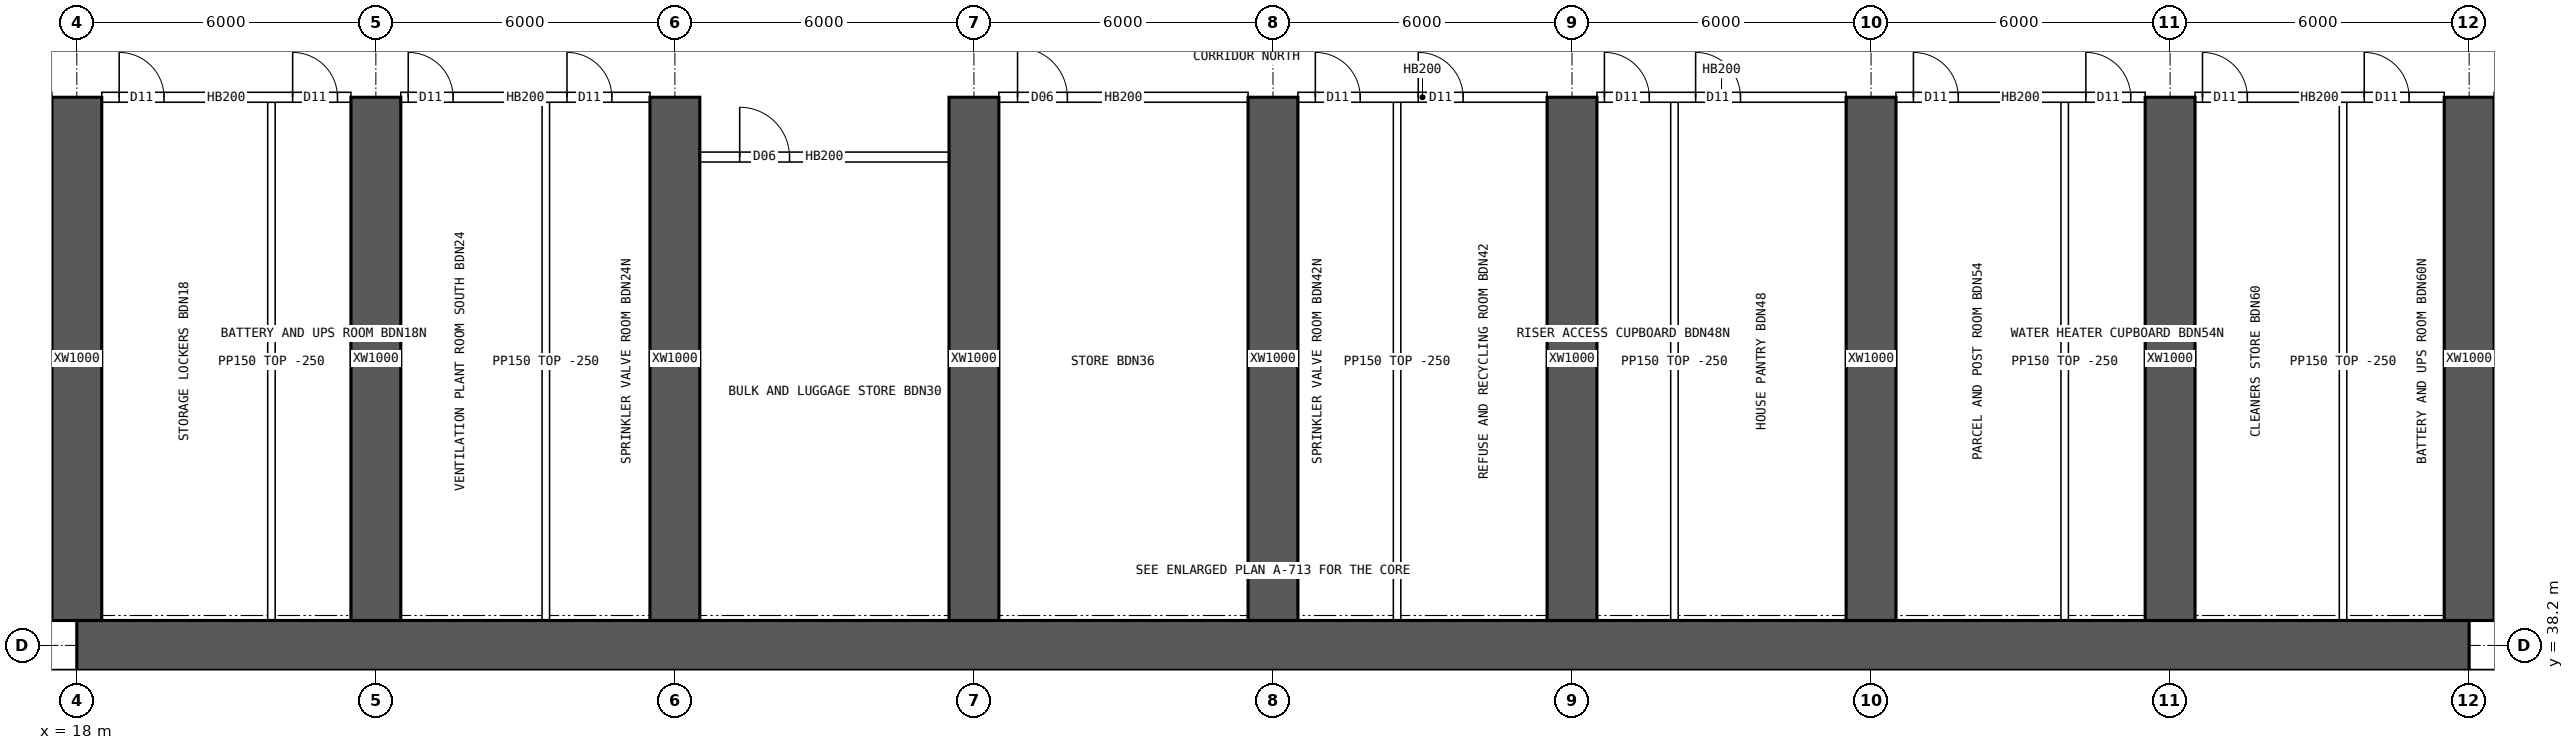
"""IFC4 building model, lengths in metres.
Left out: names, types, materials, properties, quantities, classifications, styles, units other than length and angle.
Written with IfcOpenShell. Run it as: python <this file> out.ifc"""

import sys

from ifc_helpers import new_model, si_unit, direction, frame, frame_2d, origin, place, context, subcontext, project, spatial, rectangle, extrude, element, fill, save


model = new_model("IFC4")
c1 = context("Model", 3, precision=1e-05, world=origin(), true_north=direction((0.0, 1.0)))
c2 = subcontext(c1, "Body", "Model", "MODEL_VIEW")
j1 = project(units=[si_unit("LENGTHUNIT", "METRE"), si_unit("PLANEANGLEUNIT", "RADIAN")], contexts=[c1])
p1 = place(None, origin())
s1 = spatial("IfcSite", under=j1, at=p1, CompositionType="ELEMENT")
p2 = place(p1, origin())
s2 = spatial("IfcBuilding", under=s1, at=p2, CompositionType="ELEMENT")
p3 = place(p2, frame((0.0, 0.0, 42.7)))
s3 = spatial("IfcBuildingStorey", under=s2, at=p3, CompositionType="ELEMENT", Elevation=42.7)
p4 = place(p3, frame((18.0, 38.2, 0.0), z_axis=(0.0, 0.0, 1.0), x_axis=(1.0, 0.0, 0.0)))
e1 = element("IfcWall", 1, at=p4, inside=s3, PredefinedType="SHEAR", context=c2, shape_type="SweptSolid", body=[
    extrude(rectangle(XDim=48.0, YDim=1.0, at=frame_2d((24.0, 0.0))), origin(), (0.0, 0.0, 1.0), 3.75),
])
for number, where, z_axis, x_axis in (
    (2, (21.6, 34.75, 0.0), (0.0, 0.0, 1.0), (0.0, 1.0, 0.0)),
    (3, (62.4, 34.75, 0.0), (0.0, 0.0, 1.0), (0.0, 1.0, 0.0)),
    (4, (26.0, 34.75, 0.0), (0.0, 0.0, 1.0), (0.0, 1.0, 0.0)),
    (5, (58.0, 34.75, 0.0), (0.0, 0.0, 1.0), (0.0, 1.0, 0.0)),
):
    element("IfcWall", number, at=place(p3, frame(where, z_axis=z_axis, x_axis=x_axis)), inside=s3, PredefinedType="SHEAR", context=c2, shape_type="SweptSolid", body=[
        extrude(rectangle(XDim=2.95, YDim=0.3, at=frame_2d((1.475, 0.0))), origin(), (0.0, 0.0, 1.0), 3.75),
    ])
for number, where, z_axis, x_axis in (
    (6, (18.0, 38.7, 0.0), (0.0, 0.0, 1.0), (0.0, 1.0, 0.0)),
    (7, (24.0, 38.7, 0.0), (0.0, 0.0, 1.0), (0.0, 1.0, 0.0)),
    (8, (30.0, 38.7, 0.0), (0.0, 0.0, 1.0), (0.0, 1.0, 0.0)),
    (9, (36.0, 38.7, 0.0), (0.0, 0.0, 1.0), (0.0, 1.0, 0.0)),
    (10, (42.0, 38.7, 0.0), (0.0, 0.0, 1.0), (0.0, 1.0, 0.0)),
    (11, (48.0, 38.7, 0.0), (0.0, 0.0, 1.0), (0.0, 1.0, 0.0)),
    (12, (54.0, 38.7, 0.0), (0.0, 0.0, 1.0), (0.0, 1.0, 0.0)),
    (13, (60.0, 38.7, 0.0), (0.0, 0.0, 1.0), (0.0, 1.0, 0.0)),
    (14, (66.0, 38.7, 0.0), (0.0, 0.0, 1.0), (0.0, 1.0, 0.0)),
):
    element("IfcWall", number, at=place(p3, frame(where, z_axis=z_axis, x_axis=x_axis)), inside=s3, PredefinedType="SHEAR", context=c2, shape_type="SweptSolid", body=[
        extrude(rectangle(XDim=10.5, YDim=1.0, at=frame_2d((5.25, 0.0))), origin(), (0.0, 0.0, 1.0), 3.75),
    ])
for number, where, z_axis, x_axis in (
    (15, (29.651, 34.75, 0.0), (0.0, 0.0, 1.0), (0.0, 1.0, 0.0)),
    (16, (33.946, 34.75, 0.0), (0.0, 0.0, 1.0), (0.0, 1.0, 0.0)),
    (17, (36.946, 34.75, 0.0), (0.0, 0.0, 1.0), (0.0, 1.0, 0.0)),
    (18, (41.463, 34.75, 0.0), (0.0, 0.0, 1.0), (0.0, 1.0, 0.0)),
    (19, (45.758, 34.75, 0.0), (0.0, 0.0, 1.0), (0.0, 1.0, 0.0)),
    (20, (47.058, 34.75, 0.0), (0.0, 0.0, 1.0), (0.0, 1.0, 0.0)),
    (21, (52.124, 34.75, 0.0), (0.0, 0.0, 1.0), (0.0, 1.0, 0.0)),
    (22, (54.961, 34.75, 0.0), (0.0, 0.0, 1.0), (0.0, 1.0, 0.0)),
):
    element("IfcWall", number, at=place(p3, frame(where, z_axis=z_axis, x_axis=x_axis)), inside=s3, PredefinedType="SOLIDWALL", context=c2, shape_type="SweptSolid", body=[
        extrude(rectangle(XDim=2.95, YDim=0.15, at=frame_2d((1.475, 0.0))), origin(), (0.0, 0.0, 1.0), 3.5),
    ])
p5 = place(p3, frame((18.5, 49.2, 0.0), z_axis=(0.0, 0.0, 1.0), x_axis=(1.0, 0.0, 0.0)))
e23 = element("IfcWall", 23, at=p5, inside=s3, PredefinedType="SOLIDWALL", context=c2, shape_type="SweptSolid", body=[
    extrude(rectangle(XDim=5.0, YDim=0.2, at=frame_2d((2.5, 0.0))), origin(), (0.0, 0.0, 1.0), 3.5),
])
p6 = place(p5, frame((0.35, 0.0, 0.0)))
e24 = element("IfcOpeningElement", 24, at=p6, cuts=e23, PredefinedType="OPENING", context=c2, shape_type="SweptSolid", body=[
    extrude(rectangle(XDim=0.9, YDim=2.1, at=frame_2d((0.45, 1.05))), frame((0.0, 0.11, 0.0), z_axis=(0.0, -1.0, 0.0), x_axis=(1.0, 0.0, 0.0)), (0.0, 0.0, 1.0), 0.22),
])
p7 = place(p5, frame((3.83, 0.0, 0.0)))
e25 = element("IfcOpeningElement", 25, at=p7, cuts=e23, PredefinedType="OPENING", context=c2, shape_type="SweptSolid", body=[
    extrude(rectangle(XDim=0.9, YDim=2.1, at=frame_2d((0.45, 1.05))), frame((0.0, 0.11, 0.0), z_axis=(0.0, -1.0, 0.0), x_axis=(1.0, 0.0, 0.0)), (0.0, 0.0, 1.0), 0.22),
])
p8 = place(p3, frame((24.5, 49.2, 0.0), z_axis=(0.0, 0.0, 1.0), x_axis=(1.0, 0.0, 0.0)))
e26 = element("IfcWall", 26, at=p8, inside=s3, PredefinedType="SOLIDWALL", context=c2, shape_type="SweptSolid", body=[
    extrude(rectangle(XDim=5.0, YDim=0.2, at=frame_2d((2.5, 0.0))), origin(), (0.0, 0.0, 1.0), 3.5),
])
p9 = place(p8, frame((0.15, 0.0, 0.0)))
e27 = element("IfcOpeningElement", 27, at=p9, cuts=e26, PredefinedType="OPENING", context=c2, shape_type="SweptSolid", body=[
    extrude(rectangle(XDim=0.9, YDim=2.1, at=frame_2d((0.45, 1.05))), frame((0.0, 0.11, 0.0), z_axis=(0.0, -1.0, 0.0), x_axis=(1.0, 0.0, 0.0)), (0.0, 0.0, 1.0), 0.22),
])
p10 = place(p8, frame((3.335, 0.0, 0.0)))
e28 = element("IfcOpeningElement", 28, at=p10, cuts=e26, PredefinedType="OPENING", context=c2, shape_type="SweptSolid", body=[
    extrude(rectangle(XDim=0.9, YDim=2.1, at=frame_2d((0.45, 1.05))), frame((0.0, 0.11, 0.0), z_axis=(0.0, -1.0, 0.0), x_axis=(1.0, 0.0, 0.0)), (0.0, 0.0, 1.0), 0.22),
])
p11 = place(p3, frame((36.5, 49.2, 0.0), z_axis=(0.0, 0.0, 1.0), x_axis=(1.0, 0.0, 0.0)))
e29 = element("IfcWall", 29, at=p11, inside=s3, PredefinedType="SOLIDWALL", context=c2, shape_type="SweptSolid", body=[
    extrude(rectangle(XDim=5.0, YDim=0.2, at=frame_2d((2.5, 0.0))), origin(), (0.0, 0.0, 1.0), 3.5),
])
p12 = place(p11, frame((0.375, 0.0, 0.0)))
e30 = element("IfcOpeningElement", 30, at=p12, cuts=e29, PredefinedType="OPENING", context=c2, shape_type="SweptSolid", body=[
    extrude(rectangle(XDim=1.0, YDim=2.1, at=frame_2d((0.5, 1.05))), frame((0.0, 0.11, 0.0), z_axis=(0.0, -1.0, 0.0), x_axis=(1.0, 0.0, 0.0)), (0.0, 0.0, 1.0), 0.22),
])
p13 = place(p3, frame((42.5, 49.2, 0.0), z_axis=(0.0, 0.0, 1.0), x_axis=(1.0, 0.0, 0.0)))
e31 = element("IfcWall", 31, at=p13, inside=s3, PredefinedType="SOLIDWALL", context=c2, shape_type="SweptSolid", body=[
    extrude(rectangle(XDim=5.0, YDim=0.2, at=frame_2d((2.5, 0.0))), origin(), (0.0, 0.0, 1.0), 3.5),
])
p14 = place(p13, frame((0.35, 0.0, 0.0)))
e32 = element("IfcOpeningElement", 32, at=p14, cuts=e31, PredefinedType="OPENING", context=c2, shape_type="SweptSolid", body=[
    extrude(rectangle(XDim=0.9, YDim=2.1, at=frame_2d((0.45, 1.05))), frame((0.0, 0.11, 0.0), z_axis=(0.0, -1.0, 0.0), x_axis=(1.0, 0.0, 0.0)), (0.0, 0.0, 1.0), 0.22),
])
p15 = place(p13, frame((2.415, 0.0, 0.0)))
e33 = element("IfcOpeningElement", 33, at=p15, cuts=e31, PredefinedType="OPENING", context=c2, shape_type="SweptSolid", body=[
    extrude(rectangle(XDim=0.9, YDim=2.1, at=frame_2d((0.45, 1.05))), frame((0.0, 0.11, 0.0), z_axis=(0.0, -1.0, 0.0), x_axis=(1.0, 0.0, 0.0)), (0.0, 0.0, 1.0), 0.22),
])
p16 = place(p3, frame((48.5, 49.2, 0.0), z_axis=(0.0, 0.0, 1.0), x_axis=(1.0, 0.0, 0.0)))
e34 = element("IfcWall", 34, at=p16, inside=s3, PredefinedType="SOLIDWALL", context=c2, shape_type="SweptSolid", body=[
    extrude(rectangle(XDim=5.0, YDim=0.2, at=frame_2d((2.5, 0.0))), origin(), (0.0, 0.0, 1.0), 3.5),
])
p17 = place(p16, frame((0.15, 0.0, 0.0)))
e35 = element("IfcOpeningElement", 35, at=p17, cuts=e34, PredefinedType="OPENING", context=c2, shape_type="SweptSolid", body=[
    extrude(rectangle(XDim=0.9, YDim=2.1, at=frame_2d((0.45, 1.05))), frame((0.0, 0.11, 0.0), z_axis=(0.0, -1.0, 0.0), x_axis=(1.0, 0.0, 0.0)), (0.0, 0.0, 1.0), 0.22),
])
p18 = place(p16, frame((1.98, 0.0, 0.0)))
e36 = element("IfcOpeningElement", 36, at=p18, cuts=e34, PredefinedType="OPENING", context=c2, shape_type="SweptSolid", body=[
    extrude(rectangle(XDim=0.9, YDim=2.1, at=frame_2d((0.45, 1.05))), frame((0.0, 0.11, 0.0), z_axis=(0.0, -1.0, 0.0), x_axis=(1.0, 0.0, 0.0)), (0.0, 0.0, 1.0), 0.22),
])
p19 = place(p3, frame((54.5, 49.2, 0.0), z_axis=(0.0, 0.0, 1.0), x_axis=(1.0, 0.0, 0.0)))
e37 = element("IfcWall", 37, at=p19, inside=s3, PredefinedType="SOLIDWALL", context=c2, shape_type="SweptSolid", body=[
    extrude(rectangle(XDim=5.0, YDim=0.2, at=frame_2d((2.5, 0.0))), origin(), (0.0, 0.0, 1.0), 3.5),
])
p20 = place(p19, frame((0.35, 0.0, 0.0)))
e38 = element("IfcOpeningElement", 38, at=p20, cuts=e37, PredefinedType="OPENING", context=c2, shape_type="SweptSolid", body=[
    extrude(rectangle(XDim=0.9, YDim=2.1, at=frame_2d((0.45, 1.05))), frame((0.0, 0.11, 0.0), z_axis=(0.0, -1.0, 0.0), x_axis=(1.0, 0.0, 0.0)), (0.0, 0.0, 1.0), 0.22),
])
p21 = place(p19, frame((3.81, 0.0, 0.0)))
e39 = element("IfcOpeningElement", 39, at=p21, cuts=e37, PredefinedType="OPENING", context=c2, shape_type="SweptSolid", body=[
    extrude(rectangle(XDim=0.9, YDim=2.1, at=frame_2d((0.45, 1.05))), frame((0.0, 0.11, 0.0), z_axis=(0.0, -1.0, 0.0), x_axis=(1.0, 0.0, 0.0)), (0.0, 0.0, 1.0), 0.22),
])
p22 = place(p3, frame((60.5, 49.2, 0.0), z_axis=(0.0, 0.0, 1.0), x_axis=(1.0, 0.0, 0.0)))
e40 = element("IfcWall", 40, at=p22, inside=s3, PredefinedType="SOLIDWALL", context=c2, shape_type="SweptSolid", body=[
    extrude(rectangle(XDim=5.0, YDim=0.2, at=frame_2d((2.5, 0.0))), origin(), (0.0, 0.0, 1.0), 3.5),
])
p23 = place(p22, frame((0.15, 0.0, 0.0)))
e41 = element("IfcOpeningElement", 41, at=p23, cuts=e40, PredefinedType="OPENING", context=c2, shape_type="SweptSolid", body=[
    extrude(rectangle(XDim=0.9, YDim=2.1, at=frame_2d((0.45, 1.05))), frame((0.0, 0.11, 0.0), z_axis=(0.0, -1.0, 0.0), x_axis=(1.0, 0.0, 0.0)), (0.0, 0.0, 1.0), 0.22),
])
p24 = place(p22, frame((3.395, 0.0, 0.0)))
e42 = element("IfcOpeningElement", 42, at=p24, cuts=e40, PredefinedType="OPENING", context=c2, shape_type="SweptSolid", body=[
    extrude(rectangle(XDim=0.9, YDim=2.1, at=frame_2d((0.45, 1.05))), frame((0.0, 0.11, 0.0), z_axis=(0.0, -1.0, 0.0), x_axis=(1.0, 0.0, 0.0)), (0.0, 0.0, 1.0), 0.22),
])
for number, where, z_axis, x_axis in (
    (43, (21.905, 38.7, 0.0), (0.0, 0.0, 1.0), (0.0, 1.0, 0.0)),
    (44, (27.41, 38.7, 0.0), (0.0, 0.0, 1.0), (0.0, 1.0, 0.0)),
):
    element("IfcWall", number, at=place(p3, frame(where, z_axis=z_axis, x_axis=x_axis)), inside=s3, PredefinedType="PARTITIONING", context=c2, shape_type="SweptSolid", body=[
        extrude(rectangle(XDim=10.4, YDim=0.15, at=frame_2d((5.2, 0.0))), origin(), (0.0, 0.0, 1.0), 3.5),
    ])
p25 = place(p3, frame((30.5, 48.0, 0.0), z_axis=(0.0, 0.0, 1.0), x_axis=(1.0, 0.0, 0.0)))
e45 = element("IfcWall", 45, at=p25, inside=s3, PredefinedType="SOLIDWALL", context=c2, shape_type="SweptSolid", body=[
    extrude(rectangle(XDim=5.0, YDim=0.2, at=frame_2d((2.5, 0.0))), origin(), (0.0, 0.0, 1.0), 3.5),
])
p26 = place(p25, frame((0.8, 0.0, 0.0)))
e46 = element("IfcOpeningElement", 46, at=p26, cuts=e45, PredefinedType="OPENING", context=c2, shape_type="SweptSolid", body=[
    extrude(rectangle(XDim=1.0, YDim=2.1, at=frame_2d((0.5, 1.05))), frame((0.0, 0.11, 0.0), z_axis=(0.0, -1.0, 0.0), x_axis=(1.0, 0.0, 0.0)), (0.0, 0.0, 1.0), 0.22),
])
for number, where, z_axis, x_axis in (
    (47, (44.49, 38.7, 0.0), (0.0, 0.0, 1.0), (0.0, 1.0, 0.0)),
    (48, (50.055, 38.7, 0.0), (0.0, 0.0, 1.0), (0.0, 1.0, 0.0)),
    (49, (57.885, 38.7, 0.0), (0.0, 0.0, 1.0), (0.0, 1.0, 0.0)),
    (50, (63.47, 38.7, 0.0), (0.0, 0.0, 1.0), (0.0, 1.0, 0.0)),
):
    element("IfcWall", number, at=place(p3, frame(where, z_axis=z_axis, x_axis=x_axis)), inside=s3, PredefinedType="PARTITIONING", context=c2, shape_type="SweptSolid", body=[
        extrude(rectangle(XDim=10.4, YDim=0.15, at=frame_2d((5.2, 0.0))), origin(), (0.0, 0.0, 1.0), 3.5),
    ])
p27 = place(p6, origin())
e51 = element("IfcDoor", 51, at=p27, inside=s3, OperationType="SINGLE_SWING_LEFT", PredefinedType="DOOR", context=c2, shape_type="SweptSolid", body=[
    extrude(rectangle(XDim=0.9, YDim=2.1, at=frame_2d((0.45, 1.05))), frame((0.0, 0.025, 0.0), z_axis=(0.0, -1.0, 0.0), x_axis=(1.0, 0.0, 0.0)), (0.0, 0.0, 1.0), 0.05),
])
fill(e24, e51)
p28 = place(p7, origin())
e52 = element("IfcDoor", 52, at=p28, inside=s3, OperationType="SINGLE_SWING_LEFT", PredefinedType="DOOR", context=c2, shape_type="SweptSolid", body=[
    extrude(rectangle(XDim=0.9, YDim=2.1, at=frame_2d((0.45, 1.05))), frame((0.0, 0.025, 0.0), z_axis=(0.0, -1.0, 0.0), x_axis=(1.0, 0.0, 0.0)), (0.0, 0.0, 1.0), 0.05),
])
fill(e25, e52)
p29 = place(p9, origin())
e53 = element("IfcDoor", 53, at=p29, inside=s3, OperationType="SINGLE_SWING_LEFT", PredefinedType="DOOR", context=c2, shape_type="SweptSolid", body=[
    extrude(rectangle(XDim=0.9, YDim=2.1, at=frame_2d((0.45, 1.05))), frame((0.0, 0.025, 0.0), z_axis=(0.0, -1.0, 0.0), x_axis=(1.0, 0.0, 0.0)), (0.0, 0.0, 1.0), 0.05),
])
fill(e27, e53)
p30 = place(p10, origin())
e54 = element("IfcDoor", 54, at=p30, inside=s3, OperationType="SINGLE_SWING_LEFT", PredefinedType="DOOR", context=c2, shape_type="SweptSolid", body=[
    extrude(rectangle(XDim=0.9, YDim=2.1, at=frame_2d((0.45, 1.05))), frame((0.0, 0.025, 0.0), z_axis=(0.0, -1.0, 0.0), x_axis=(1.0, 0.0, 0.0)), (0.0, 0.0, 1.0), 0.05),
])
fill(e28, e54)
p31 = place(p26, origin())
e55 = element("IfcDoor", 55, at=p31, inside=s3, OperationType="SINGLE_SWING_LEFT", PredefinedType="DOOR", context=c2, shape_type="SweptSolid", body=[
    extrude(rectangle(XDim=1.0, YDim=2.1, at=frame_2d((0.5, 1.05))), frame((0.0, 0.025, 0.0), z_axis=(0.0, -1.0, 0.0), x_axis=(1.0, 0.0, 0.0)), (0.0, 0.0, 1.0), 0.05),
])
fill(e46, e55)
p32 = place(p12, origin())
e56 = element("IfcDoor", 56, at=p32, inside=s3, OperationType="SINGLE_SWING_LEFT", PredefinedType="DOOR", context=c2, shape_type="SweptSolid", body=[
    extrude(rectangle(XDim=1.0, YDim=2.1, at=frame_2d((0.5, 1.05))), frame((0.0, 0.025, 0.0), z_axis=(0.0, -1.0, 0.0), x_axis=(1.0, 0.0, 0.0)), (0.0, 0.0, 1.0), 0.05),
])
fill(e30, e56)
p33 = place(p14, origin())
e57 = element("IfcDoor", 57, at=p33, inside=s3, OperationType="SINGLE_SWING_LEFT", PredefinedType="DOOR", context=c2, shape_type="SweptSolid", body=[
    extrude(rectangle(XDim=0.9, YDim=2.1, at=frame_2d((0.45, 1.05))), frame((0.0, 0.025, 0.0), z_axis=(0.0, -1.0, 0.0), x_axis=(1.0, 0.0, 0.0)), (0.0, 0.0, 1.0), 0.05),
])
fill(e32, e57)
p34 = place(p15, origin())
e58 = element("IfcDoor", 58, at=p34, inside=s3, OperationType="SINGLE_SWING_LEFT", PredefinedType="DOOR", context=c2, shape_type="SweptSolid", body=[
    extrude(rectangle(XDim=0.9, YDim=2.1, at=frame_2d((0.45, 1.05))), frame((0.0, 0.025, 0.0), z_axis=(0.0, -1.0, 0.0), x_axis=(1.0, 0.0, 0.0)), (0.0, 0.0, 1.0), 0.05),
])
fill(e33, e58)
p35 = place(p17, origin())
e59 = element("IfcDoor", 59, at=p35, inside=s3, OperationType="SINGLE_SWING_LEFT", PredefinedType="DOOR", context=c2, shape_type="SweptSolid", body=[
    extrude(rectangle(XDim=0.9, YDim=2.1, at=frame_2d((0.45, 1.05))), frame((0.0, 0.025, 0.0), z_axis=(0.0, -1.0, 0.0), x_axis=(1.0, 0.0, 0.0)), (0.0, 0.0, 1.0), 0.05),
])
fill(e35, e59)
p36 = place(p18, origin())
e60 = element("IfcDoor", 60, at=p36, inside=s3, OperationType="SINGLE_SWING_LEFT", PredefinedType="DOOR", context=c2, shape_type="SweptSolid", body=[
    extrude(rectangle(XDim=0.9, YDim=2.1, at=frame_2d((0.45, 1.05))), frame((0.0, 0.025, 0.0), z_axis=(0.0, -1.0, 0.0), x_axis=(1.0, 0.0, 0.0)), (0.0, 0.0, 1.0), 0.05),
])
fill(e36, e60)
p37 = place(p20, origin())
e61 = element("IfcDoor", 61, at=p37, inside=s3, OperationType="SINGLE_SWING_LEFT", PredefinedType="DOOR", context=c2, shape_type="SweptSolid", body=[
    extrude(rectangle(XDim=0.9, YDim=2.1, at=frame_2d((0.45, 1.05))), frame((0.0, 0.025, 0.0), z_axis=(0.0, -1.0, 0.0), x_axis=(1.0, 0.0, 0.0)), (0.0, 0.0, 1.0), 0.05),
])
fill(e38, e61)
p38 = place(p21, origin())
e62 = element("IfcDoor", 62, at=p38, inside=s3, OperationType="SINGLE_SWING_LEFT", PredefinedType="DOOR", context=c2, shape_type="SweptSolid", body=[
    extrude(rectangle(XDim=0.9, YDim=2.1, at=frame_2d((0.45, 1.05))), frame((0.0, 0.025, 0.0), z_axis=(0.0, -1.0, 0.0), x_axis=(1.0, 0.0, 0.0)), (0.0, 0.0, 1.0), 0.05),
])
fill(e39, e62)
p39 = place(p23, origin())
e63 = element("IfcDoor", 63, at=p39, inside=s3, OperationType="SINGLE_SWING_LEFT", PredefinedType="DOOR", context=c2, shape_type="SweptSolid", body=[
    extrude(rectangle(XDim=0.9, YDim=2.1, at=frame_2d((0.45, 1.05))), frame((0.0, 0.025, 0.0), z_axis=(0.0, -1.0, 0.0), x_axis=(1.0, 0.0, 0.0)), (0.0, 0.0, 1.0), 0.05),
])
fill(e41, e63)
p40 = place(p24, origin())
e64 = element("IfcDoor", 64, at=p40, inside=s3, OperationType="SINGLE_SWING_LEFT", PredefinedType="DOOR", context=c2, shape_type="SweptSolid", body=[
    extrude(rectangle(XDim=0.9, YDim=2.1, at=frame_2d((0.45, 1.05))), frame((0.0, 0.025, 0.0), z_axis=(0.0, -1.0, 0.0), x_axis=(1.0, 0.0, 0.0)), (0.0, 0.0, 1.0), 0.05),
])
fill(e42, e64)
save(model, sys.argv[1])
